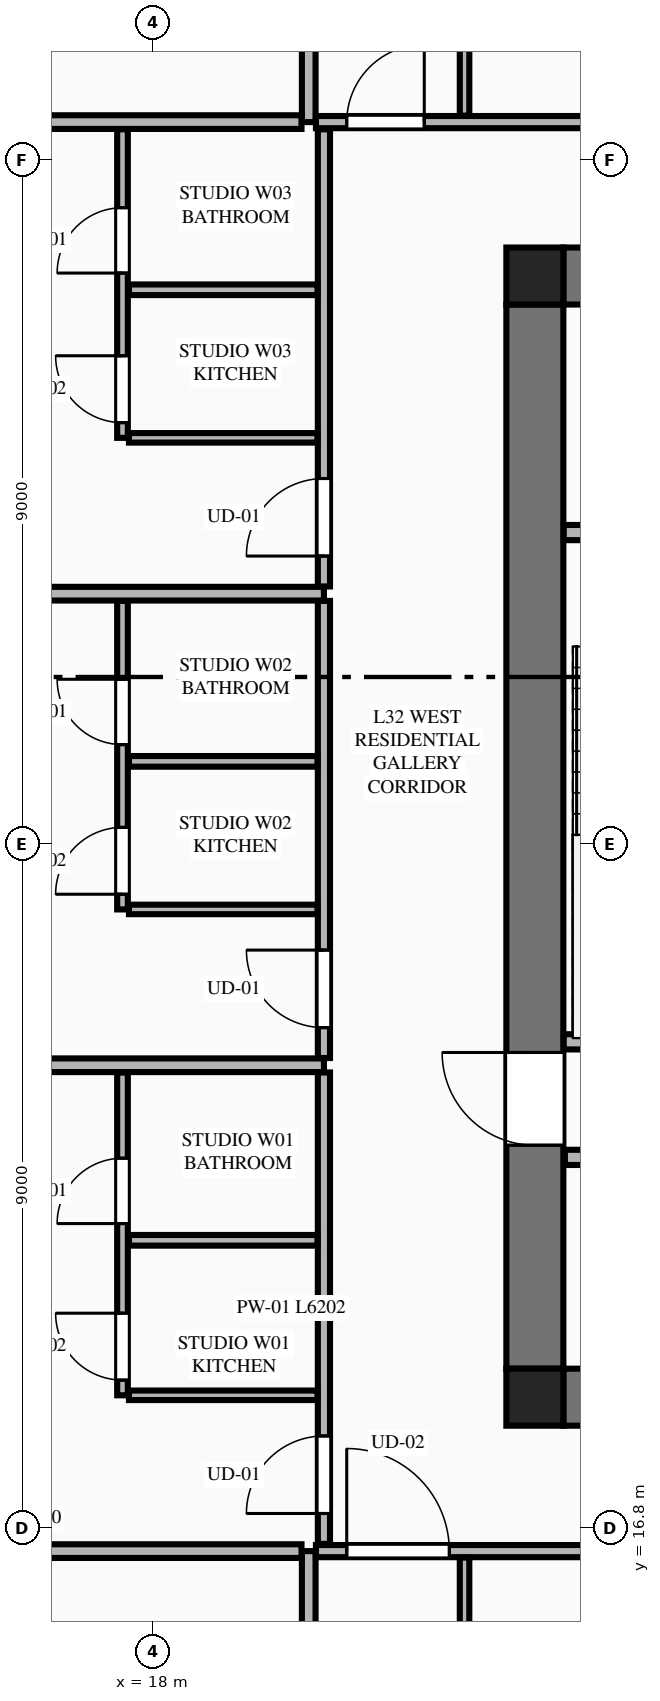
"""IFC4 building model, lengths in metres.
Left out: names, types, materials, properties, quantities, classifications, styles, units other than length and angle.
Written with IfcOpenShell. Run it as: python <this file> out.ifc"""

import sys

from ifc_helpers import new_model, si_unit, direction, frame, frame_2d, origin, origin_2d, place, context, subcontext, project, spatial, rectangle, extrude, element, fill, save


model = new_model("IFC4")
c1 = context("Model", 3, precision=1e-05, world=origin(), true_north=direction((0.0, 1.0)))
c2 = subcontext(c1, "Body", "Model", "MODEL_VIEW")
j1 = project(units=[si_unit("LENGTHUNIT", "METRE"), si_unit("PLANEANGLEUNIT", "RADIAN")], contexts=[c1])
p1 = place(None, origin())
s1 = spatial("IfcSite", under=j1, at=p1, CompositionType="ELEMENT")
p2 = place(p1, origin())
s2 = spatial("IfcBuilding", under=s1, at=p2, CompositionType="ELEMENT")
p3 = place(p2, frame((0.0, 0.0, 123.25)))
s3 = spatial("IfcBuildingStorey", under=s2, at=p3, CompositionType="ELEMENT", Elevation=123.25)
for number, where, z_axis, x_axis in (
    (1, (23.025, 18.525, 0.0), (0.0, 0.0, 1.0), (1.0, 0.0, 0.0)),
    (2, (23.025, 33.275, 0.0), (0.0, 0.0, 1.0), (1.0, 0.0, 0.0)),
):
    element("IfcColumn", number, at=place(p3, frame(where, z_axis=z_axis, x_axis=x_axis)), inside=s3, PredefinedType="COLUMN", context=c2, shape_type="SweptSolid", body=[
        extrude(rectangle(XDim=0.75, YDim=0.75, at=origin_2d()), origin(), (0.0, 0.0, 1.0), 3.55),
    ])
for number, where, z_axis, x_axis in (
    (3, (23.4, 18.525, 0.0), (0.0, 0.0, 1.0), (1.0, 0.0, 0.0)),
    (4, (23.4, 33.275, 0.0), (0.0, 0.0, 1.0), (1.0, 0.0, 0.0)),
):
    element("IfcWall", number, at=place(p3, frame(where, z_axis=z_axis, x_axis=x_axis)), inside=s3, PredefinedType="SHEAR", context=c2, shape_type="SweptSolid", body=[
        extrude(rectangle(XDim=18.0, YDim=0.75, at=frame_2d((9.0, 0.0))), origin(), (0.0, 0.0, 1.0), 3.34),
    ])
p4 = place(p3, frame((23.025, 18.9, 0.0), z_axis=(0.0, 0.0, 1.0), x_axis=(0.0, 1.0, 0.0)))
e5 = element("IfcWall", 5, at=p4, inside=s3, PredefinedType="SHEAR", context=c2, shape_type="SweptSolid", body=[
    extrude(rectangle(XDim=14.0, YDim=0.75, at=frame_2d((7.0, 0.0))), origin(), (0.0, 0.0, 1.0), 3.34),
])
p5 = place(p4, frame((2.94, 0.0, 0.0)))
e6 = element("IfcOpeningElement", 6, at=p5, cuts=e5, PredefinedType="OPENING", context=c2, shape_type="SweptSolid", body=[
    extrude(rectangle(XDim=1.22, YDim=2.25, at=frame_2d((0.61, 1.125))), frame((0.0, 0.385, 0.0), z_axis=(0.0, -1.0, 0.0), x_axis=(1.0, 0.0, 0.0)), (0.0, 0.0, 1.0), 0.77),
])
p6 = place(p3, frame((23.405, 23.2, 0.0), z_axis=(0.0, 0.0, 1.0), x_axis=(1.0, 0.0, 0.0)))
e7 = element("IfcWall", 7, at=p6, inside=s3, PredefinedType="PLUMBINGWALL", context=c2, shape_type="SweptSolid", body=[
    extrude(rectangle(XDim=3.27, YDim=0.2, at=frame_2d((1.635, 0.0))), origin(), (0.0, 0.0, 1.0), 3.34),
])
p7 = place(p3, frame((23.405, 29.9, 0.0), z_axis=(0.0, 0.0, 1.0), x_axis=(1.0, 0.0, 0.0)))
e8 = element("IfcWall", 8, at=p7, inside=s3, PredefinedType="PLUMBINGWALL", context=c2, shape_type="SweptSolid", body=[
    extrude(rectangle(XDim=3.27, YDim=0.2, at=frame_2d((1.635, 0.0))), origin(), (0.0, 0.0, 1.0), 3.34),
])
p8 = place(p7, frame((1.85, 0.0, 0.0)))
e9 = element("IfcOpeningElement", 9, at=p8, cuts=e8, PredefinedType="OPENING", context=c2, shape_type="SweptSolid", body=[
    extrude(rectangle(XDim=0.85, YDim=2.05, at=frame_2d((0.425, 1.025))), frame((0.0, 0.11, 0.0), z_axis=(0.0, -1.0, 0.0), x_axis=(1.0, 0.0, 0.0)), (0.0, 0.0, 1.0), 0.22),
])
p9 = place(p3, frame((23.42, 21.68, 0.0), z_axis=(0.0, 0.0, 1.0), x_axis=(1.0, 0.0, 0.0)))
e10 = element("IfcWall", 10, at=p9, inside=s3, PredefinedType="PLUMBINGWALL", context=c2, shape_type="SweptSolid", body=[
    extrude(rectangle(XDim=17.96, YDim=0.2, at=frame_2d((8.98, 0.0))), origin(), (0.0, 0.0, 1.0), 3.34),
])
p10 = place(p9, frame((11.6, 0.0, 0.0)))
e11 = element("IfcOpeningElement", 11, at=p10, cuts=e10, PredefinedType="OPENING", context=c2, shape_type="SweptSolid", body=[
    extrude(rectangle(XDim=1.1, YDim=2.2, at=frame_2d((0.55, 1.1))), frame((0.0, 0.11, 0.0), z_axis=(0.0, -1.0, 0.0), x_axis=(1.0, 0.0, 0.0)), (0.0, 0.0, 1.0), 0.22),
])
p11 = place(p9, frame((0.41, 0.0, 0.0)))
e12 = element("IfcOpeningElement", 12, at=p11, cuts=e10, PredefinedType="OPENING", context=c2, shape_type="SweptSolid", body=[
    extrude(rectangle(XDim=0.85, YDim=2.05, at=frame_2d((0.425, 1.025))), frame((0.0, 0.11, 0.0), z_axis=(0.0, -1.0, 0.0), x_axis=(1.0, 0.0, 0.0)), (0.0, 0.0, 1.0), 0.22),
])
p12 = place(p9, frame((13.78, 0.0, 0.0)))
e13 = element("IfcOpeningElement", 13, at=p12, cuts=e10, PredefinedType="OPENING", context=c2, shape_type="SweptSolid", body=[
    extrude(rectangle(XDim=0.85, YDim=2.05, at=frame_2d((0.425, 1.025))), frame((0.0, 0.11, 0.0), z_axis=(0.0, -1.0, 0.0), x_axis=(1.0, 0.0, 0.0)), (0.0, 0.0, 1.0), 0.22),
])
p13 = place(p9, frame((16.13, 0.0, 0.0)))
e14 = element("IfcOpeningElement", 14, at=p13, cuts=e10, PredefinedType="OPENING", context=c2, shape_type="SweptSolid", body=[
    extrude(rectangle(XDim=0.85, YDim=2.05, at=frame_2d((0.425, 1.025))), frame((0.0, 0.11, 0.0), z_axis=(0.0, -1.0, 0.0), x_axis=(1.0, 0.0, 0.0)), (0.0, 0.0, 1.0), 0.22),
])
p14 = place(p3, frame((20.05, 4.105, 0.0), z_axis=(0.0, 0.0, 1.0), x_axis=(0.0, 1.0, 0.0)))
e15 = element("IfcWall", 15, at=p14, inside=s3, PredefinedType="PARTITIONING", context=c2, shape_type="SweptSolid", body=[
    extrude(rectangle(XDim=12.395, YDim=0.18, at=frame_2d((6.198, 0.0))), origin(), (0.0, 0.0, 1.0), 3.34),
])
p15 = place(p3, frame((20.145, 16.5, 0.0), z_axis=(0.0, 0.0, 1.0), x_axis=(1.0, 0.0, 0.0)))
e16 = element("IfcWall", 16, at=p15, inside=s3, PredefinedType="PARTITIONING", context=c2, shape_type="SweptSolid", body=[
    extrude(rectangle(XDim=24.51, YDim=0.16, at=frame_2d((12.255, 0.0))), origin(), (0.0, 0.0, 1.0), 3.34),
])
p16 = place(p15, frame((0.405, 0.0, 0.0)))
e17 = element("IfcOpeningElement", 17, at=p16, cuts=e16, PredefinedType="OPENING", context=c2, shape_type="SweptSolid", body=[
    extrude(rectangle(XDim=1.35, YDim=2.35, at=frame_2d((0.675, 1.175))), frame((0.0, 0.09, 0.0), z_axis=(0.0, -1.0, 0.0), x_axis=(1.0, 0.0, 0.0)), (0.0, 0.0, 1.0), 0.18),
])
p17 = place(p3, frame((22.1, 10.284, 0.0), z_axis=(0.0, 0.0, 1.0), x_axis=(0.0, 1.0, 0.0)))
e18 = element("IfcWall", 18, at=p17, inside=s3, PredefinedType="PARTITIONING", context=c2, shape_type="SweptSolid", body=[
    extrude(rectangle(XDim=6.131, YDim=0.125, at=frame_2d((3.065, 0.0))), origin(), (0.0, 0.0, 1.0), 2.722),
])
p18 = place(p3, frame((20.05, 35.3, 0.0), z_axis=(0.0, 0.0, 1.0), x_axis=(0.0, 1.0, 0.0)))
e19 = element("IfcWall", 19, at=p18, inside=s3, PredefinedType="PARTITIONING", context=c2, shape_type="SweptSolid", body=[
    extrude(rectangle(XDim=12.195, YDim=0.18, at=frame_2d((6.098, 0.0))), origin(), (0.0, 0.0, 1.0), 3.34),
])
p19 = place(p3, frame((20.145, 35.3, 0.0), z_axis=(0.0, 0.0, 1.0), x_axis=(1.0, 0.0, 0.0)))
e20 = element("IfcWall", 20, at=p19, inside=s3, PredefinedType="PARTITIONING", context=c2, shape_type="SweptSolid", body=[
    extrude(rectangle(XDim=24.51, YDim=0.16, at=frame_2d((12.255, 0.0))), origin(), (0.0, 0.0, 1.0), 3.34),
])
p20 = place(p19, frame((0.405, 0.0, 0.0)))
e21 = element("IfcOpeningElement", 21, at=p20, cuts=e20, PredefinedType="OPENING", context=c2, shape_type="SweptSolid", body=[
    extrude(rectangle(XDim=1.02, YDim=2.25, at=frame_2d((0.51, 1.125))), frame((0.0, 0.09, 0.0), z_axis=(0.0, -1.0, 0.0), x_axis=(1.0, 0.0, 0.0)), (0.0, 0.0, 1.0), 0.18),
])
p21 = place(p3, frame((22.1, 35.385, 0.0), z_axis=(0.0, 0.0, 1.0), x_axis=(0.0, 1.0, 0.0)))
e22 = element("IfcWall", 22, at=p21, inside=s3, PredefinedType="PARTITIONING", context=c2, shape_type="SweptSolid", body=[
    extrude(rectangle(XDim=3.956, YDim=0.125, at=frame_2d((1.978, 0.0))), origin(), (0.0, 0.0, 1.0), 2.722),
])
p22 = place(p3, frame((12.185, 16.5, 0.0), z_axis=(0.0, 0.0, 1.0), x_axis=(1.0, 0.0, 0.0)))
e23 = element("IfcWall", 23, at=p22, inside=s3, PredefinedType="PARTITIONING", context=c2, shape_type="SweptSolid", body=[
    extrude(rectangle(XDim=7.77, YDim=0.18, at=frame_2d((3.885, 0.0))), origin(), (0.0, 0.0, 1.0), 3.34),
])
p23 = place(p3, frame((12.286, 35.3, 0.0), z_axis=(0.0, 0.0, 1.0), x_axis=(1.0, 0.0, 0.0)))
e24 = element("IfcWall", 24, at=p23, inside=s3, PredefinedType="PARTITIONING", context=c2, shape_type="SweptSolid", body=[
    extrude(rectangle(XDim=7.669, YDim=0.18, at=frame_2d((3.834, 0.0))), origin(), (0.0, 0.0, 1.0), 3.34),
])
p24 = place(p3, frame((20.25, 16.595, 0.0), z_axis=(0.0, 0.0, 1.0), x_axis=(0.0, 1.0, 0.0)))
e25 = element("IfcWall", 25, at=p24, inside=s3, PredefinedType="PARTITIONING", context=c2, shape_type="SweptSolid", body=[
    extrude(rectangle(XDim=6.202, YDim=0.16, at=frame_2d((3.101, 0.0))), origin(), (0.0, 0.0, 1.0), 3.34),
])
p25 = place(p24, frame((0.4, 0.0, 0.0)))
e26 = element("IfcOpeningElement", 26, at=p25, cuts=e25, PredefinedType="OPENING", context=c2, shape_type="SweptSolid", body=[
    extrude(rectangle(XDim=1.02, YDim=2.25, at=frame_2d((0.51, 1.125))), frame((0.0, 0.09, 0.0), z_axis=(0.0, -1.0, 0.0), x_axis=(1.0, 0.0, 0.0)), (0.0, 0.0, 1.0), 0.18),
])
p26 = place(p3, frame((17.685, 18.55, 0.0), z_axis=(0.0, 0.0, 1.0), x_axis=(1.0, 0.0, 0.0)))
e27 = element("IfcWall", 27, at=p26, inside=s3, PredefinedType="PARTITIONING", context=c2, shape_type="SweptSolid", body=[
    extrude(rectangle(XDim=2.48, YDim=0.125, at=frame_2d((1.24, 0.0))), origin(), (0.0, 0.0, 1.0), 2.722),
])
p27 = place(p3, frame((17.6, 18.55, 0.0), z_axis=(0.0, 0.0, 1.0), x_axis=(0.0, 1.0, 0.0)))
e28 = element("IfcWall", 28, at=p27, inside=s3, PredefinedType="PLUMBINGWALL", context=c2, shape_type="SweptSolid", body=[
    extrude(rectangle(XDim=4.247, YDim=0.14, at=frame_2d((2.124, 0.0))), origin(), (0.0, 0.0, 1.0), 3.34),
])
p28 = place(p27, frame((2.259, 0.0, 0.0)))
e29 = element("IfcOpeningElement", 29, at=p28, cuts=e28, PredefinedType="OPENING", context=c2, shape_type="SweptSolid", body=[
    extrude(rectangle(XDim=0.86, YDim=2.1, at=frame_2d((0.43, 1.05))), frame((0.0, 0.08, 0.0), z_axis=(0.0, -1.0, 0.0), x_axis=(1.0, 0.0, 0.0)), (0.0, 0.0, 1.0), 0.16),
])
p29 = place(p27, frame((0.2, 0.0, 0.0)))
e30 = element("IfcOpeningElement", 30, at=p29, cuts=e28, PredefinedType="OPENING", context=c2, shape_type="SweptSolid", body=[
    extrude(rectangle(XDim=0.88, YDim=2.15, at=frame_2d((0.44, 1.075))), frame((0.0, 0.08, 0.0), z_axis=(0.0, -1.0, 0.0), x_axis=(1.0, 0.0, 0.0)), (0.0, 0.0, 1.0), 0.16),
])
p30 = place(p3, frame((17.685, 20.589, 0.0), z_axis=(0.0, 0.0, 1.0), x_axis=(1.0, 0.0, 0.0)))
e31 = element("IfcWall", 31, at=p30, inside=s3, PredefinedType="PLUMBINGWALL", context=c2, shape_type="SweptSolid", body=[
    extrude(rectangle(XDim=2.48, YDim=0.14, at=frame_2d((1.24, 0.0))), origin(), (0.0, 0.0, 1.0), 3.34),
])
p31 = place(p3, frame((8.951, 22.892, 0.0), z_axis=(0.0, 0.0, 1.0), x_axis=(1.0, 0.0, 0.0)))
e32 = element("IfcWall", 32, at=p31, inside=s3, PredefinedType="PARTITIONING", context=c2, shape_type="SweptSolid", body=[
    extrude(rectangle(XDim=11.299, YDim=0.18, at=frame_2d((5.649, 0.0))), origin(), (0.0, 0.0, 1.0), 3.34),
])
p32 = place(p3, frame((20.25, 22.987, 0.0), z_axis=(0.0, 0.0, 1.0), x_axis=(0.0, 1.0, 0.0)))
e33 = element("IfcWall", 33, at=p32, inside=s3, PredefinedType="PARTITIONING", context=c2, shape_type="SweptSolid", body=[
    extrude(rectangle(XDim=6.014, YDim=0.16, at=frame_2d((3.007, 0.0))), origin(), (0.0, 0.0, 1.0), 3.34),
])
p33 = place(p32, frame((0.4, 0.0, 0.0)))
e34 = element("IfcOpeningElement", 34, at=p33, cuts=e33, PredefinedType="OPENING", context=c2, shape_type="SweptSolid", body=[
    extrude(rectangle(XDim=1.02, YDim=2.25, at=frame_2d((0.51, 1.125))), frame((0.0, 0.09, 0.0), z_axis=(0.0, -1.0, 0.0), x_axis=(1.0, 0.0, 0.0)), (0.0, 0.0, 1.0), 0.18),
])
p34 = place(p3, frame((17.685, 24.942, 0.0), z_axis=(0.0, 0.0, 1.0), x_axis=(1.0, 0.0, 0.0)))
e35 = element("IfcWall", 35, at=p34, inside=s3, PredefinedType="PARTITIONING", context=c2, shape_type="SweptSolid", body=[
    extrude(rectangle(XDim=2.48, YDim=0.125, at=frame_2d((1.24, 0.0))), origin(), (0.0, 0.0, 1.0), 3.34),
])
p35 = place(p3, frame((17.6, 24.942, 0.0), z_axis=(0.0, 0.0, 1.0), x_axis=(0.0, 1.0, 0.0)))
e36 = element("IfcWall", 36, at=p35, inside=s3, PredefinedType="PLUMBINGWALL", context=c2, shape_type="SweptSolid", body=[
    extrude(rectangle(XDim=4.059, YDim=0.14, at=frame_2d((2.03, 0.0))), origin(), (0.0, 0.0, 1.0), 3.34),
])
p36 = place(p35, frame((2.168, 0.0, 0.0)))
e37 = element("IfcOpeningElement", 37, at=p36, cuts=e36, PredefinedType="OPENING", context=c2, shape_type="SweptSolid", body=[
    extrude(rectangle(XDim=0.86, YDim=2.1, at=frame_2d((0.43, 1.05))), frame((0.0, 0.08, 0.0), z_axis=(0.0, -1.0, 0.0), x_axis=(1.0, 0.0, 0.0)), (0.0, 0.0, 1.0), 0.16),
])
p37 = place(p35, frame((0.2, 0.0, 0.0)))
e38 = element("IfcOpeningElement", 38, at=p37, cuts=e36, PredefinedType="OPENING", context=c2, shape_type="SweptSolid", body=[
    extrude(rectangle(XDim=0.88, YDim=2.15, at=frame_2d((0.44, 1.075))), frame((0.0, 0.08, 0.0), z_axis=(0.0, -1.0, 0.0), x_axis=(1.0, 0.0, 0.0)), (0.0, 0.0, 1.0), 0.16),
])
p38 = place(p3, frame((17.685, 26.89, 0.0), z_axis=(0.0, 0.0, 1.0), x_axis=(1.0, 0.0, 0.0)))
e39 = element("IfcWall", 39, at=p38, inside=s3, PredefinedType="PLUMBINGWALL", context=c2, shape_type="SweptSolid", body=[
    extrude(rectangle(XDim=2.48, YDim=0.14, at=frame_2d((1.24, 0.0))), origin(), (0.0, 0.0, 1.0), 3.34),
])
p39 = place(p3, frame((9.147, 29.096, 0.0), z_axis=(0.0, 0.0, 1.0), x_axis=(1.0, 0.0, 0.0)))
e40 = element("IfcWall", 40, at=p39, inside=s3, PredefinedType="PARTITIONING", context=c2, shape_type="SweptSolid", body=[
    extrude(rectangle(XDim=11.103, YDim=0.18, at=frame_2d((5.552, 0.0))), origin(), (0.0, 0.0, 1.0), 3.34),
])
p40 = place(p3, frame((20.25, 29.191, 0.0), z_axis=(0.0, 0.0, 1.0), x_axis=(0.0, 1.0, 0.0)))
e41 = element("IfcWall", 41, at=p40, inside=s3, PredefinedType="PARTITIONING", context=c2, shape_type="SweptSolid", body=[
    extrude(rectangle(XDim=6.014, YDim=0.16, at=frame_2d((3.007, 0.0))), origin(), (0.0, 0.0, 1.0), 3.34),
])
p41 = place(p40, frame((0.4, 0.0, 0.0)))
e42 = element("IfcOpeningElement", 42, at=p41, cuts=e41, PredefinedType="OPENING", context=c2, shape_type="SweptSolid", body=[
    extrude(rectangle(XDim=1.02, YDim=2.25, at=frame_2d((0.51, 1.125))), frame((0.0, 0.09, 0.0), z_axis=(0.0, -1.0, 0.0), x_axis=(1.0, 0.0, 0.0)), (0.0, 0.0, 1.0), 0.18),
])
p42 = place(p3, frame((17.685, 31.146, 0.0), z_axis=(0.0, 0.0, 1.0), x_axis=(1.0, 0.0, 0.0)))
e43 = element("IfcWall", 43, at=p42, inside=s3, PredefinedType="PARTITIONING", context=c2, shape_type="SweptSolid", body=[
    extrude(rectangle(XDim=2.48, YDim=0.125, at=frame_2d((1.24, 0.0))), origin(), (0.0, 0.0, 1.0), 3.34),
])
p43 = place(p3, frame((17.6, 31.146, 0.0), z_axis=(0.0, 0.0, 1.0), x_axis=(0.0, 1.0, 0.0)))
e44 = element("IfcWall", 44, at=p43, inside=s3, PredefinedType="PLUMBINGWALL", context=c2, shape_type="SweptSolid", body=[
    extrude(rectangle(XDim=4.059, YDim=0.14, at=frame_2d((2.03, 0.0))), origin(), (0.0, 0.0, 1.0), 3.34),
])
p44 = place(p43, frame((2.168, 0.0, 0.0)))
e45 = element("IfcOpeningElement", 45, at=p44, cuts=e44, PredefinedType="OPENING", context=c2, shape_type="SweptSolid", body=[
    extrude(rectangle(XDim=0.86, YDim=2.1, at=frame_2d((0.43, 1.05))), frame((0.0, 0.08, 0.0), z_axis=(0.0, -1.0, 0.0), x_axis=(1.0, 0.0, 0.0)), (0.0, 0.0, 1.0), 0.16),
])
p45 = place(p43, frame((0.2, 0.0, 0.0)))
e46 = element("IfcOpeningElement", 46, at=p45, cuts=e44, PredefinedType="OPENING", context=c2, shape_type="SweptSolid", body=[
    extrude(rectangle(XDim=0.88, YDim=2.15, at=frame_2d((0.44, 1.075))), frame((0.0, 0.08, 0.0), z_axis=(0.0, -1.0, 0.0), x_axis=(1.0, 0.0, 0.0)), (0.0, 0.0, 1.0), 0.16),
])
p46 = place(p3, frame((17.685, 33.094, 0.0), z_axis=(0.0, 0.0, 1.0), x_axis=(1.0, 0.0, 0.0)))
e47 = element("IfcWall", 47, at=p46, inside=s3, PredefinedType="PLUMBINGWALL", context=c2, shape_type="SweptSolid", body=[
    extrude(rectangle(XDim=2.48, YDim=0.14, at=frame_2d((1.24, 0.0))), origin(), (0.0, 0.0, 1.0), 3.34),
])
p47 = place(p5, origin())
e48 = element("IfcDoor", 48, at=p47, inside=s3, OperationType="SINGLE_SWING_RIGHT", PredefinedType="DOOR", context=c2, shape_type="SweptSolid", body=[
    extrude(rectangle(XDim=1.22, YDim=2.25, at=frame_2d((0.61, 1.125))), frame((0.0, 0.025, 0.0), z_axis=(0.0, -1.0, 0.0), x_axis=(1.0, 0.0, 0.0)), (0.0, 0.0, 1.0), 0.05),
])
fill(e6, e48)
p48 = place(p16, origin())
e49 = element("IfcDoor", 49, at=p48, inside=s3, OperationType="SINGLE_SWING_LEFT", PredefinedType="DOOR", context=c2, shape_type="SweptSolid", body=[
    extrude(rectangle(XDim=1.35, YDim=2.35, at=frame_2d((0.675, 1.175))), frame((0.0, 0.025, 0.0), z_axis=(0.0, -1.0, 0.0), x_axis=(1.0, 0.0, 0.0)), (0.0, 0.0, 1.0), 0.05),
])
fill(e17, e49)
p49 = place(p20, origin())
e50 = element("IfcDoor", 50, at=p49, inside=s3, OperationType="SINGLE_SWING_RIGHT", PredefinedType="DOOR", context=c2, shape_type="SweptSolid", body=[
    extrude(rectangle(XDim=1.02, YDim=2.25, at=frame_2d((0.51, 1.125))), frame((0.0, 0.025, 0.0), z_axis=(0.0, -1.0, 0.0), x_axis=(1.0, 0.0, 0.0)), (0.0, 0.0, 1.0), 0.05),
])
fill(e21, e50)
p50 = place(p28, origin())
e51 = element("IfcDoor", 51, at=p50, inside=s3, OperationType="SINGLE_SWING_LEFT", PredefinedType="DOOR", context=c2, shape_type="SweptSolid", body=[
    extrude(rectangle(XDim=0.86, YDim=2.1, at=frame_2d((0.43, 1.05))), frame((0.0, 0.025, 0.0), z_axis=(0.0, -1.0, 0.0), x_axis=(1.0, 0.0, 0.0)), (0.0, 0.0, 1.0), 0.05),
])
fill(e29, e51)
p51 = place(p25, origin())
e52 = element("IfcDoor", 52, at=p51, inside=s3, OperationType="SINGLE_SWING_LEFT", PredefinedType="DOOR", context=c2, shape_type="SweptSolid", body=[
    extrude(rectangle(XDim=1.02, YDim=2.25, at=frame_2d((0.51, 1.125))), frame((0.0, 0.025, 0.0), z_axis=(0.0, -1.0, 0.0), x_axis=(1.0, 0.0, 0.0)), (0.0, 0.0, 1.0), 0.05),
])
fill(e26, e52)
p52 = place(p29, origin())
e53 = element("IfcDoor", 53, at=p52, inside=s3, OperationType="SINGLE_SWING_RIGHT", PredefinedType="DOOR", context=c2, shape_type="SweptSolid", body=[
    extrude(rectangle(XDim=0.88, YDim=2.15, at=frame_2d((0.44, 1.075))), frame((0.0, 0.025, 0.0), z_axis=(0.0, -1.0, 0.0), x_axis=(1.0, 0.0, 0.0)), (0.0, 0.0, 1.0), 0.05),
])
fill(e30, e53)
p53 = place(p36, origin())
e54 = element("IfcDoor", 54, at=p53, inside=s3, OperationType="SINGLE_SWING_RIGHT", PredefinedType="DOOR", context=c2, shape_type="SweptSolid", body=[
    extrude(rectangle(XDim=0.86, YDim=2.1, at=frame_2d((0.43, 1.05))), frame((0.0, 0.025, 0.0), z_axis=(0.0, -1.0, 0.0), x_axis=(1.0, 0.0, 0.0)), (0.0, 0.0, 1.0), 0.05),
])
fill(e37, e54)
p54 = place(p33, origin())
e55 = element("IfcDoor", 55, at=p54, inside=s3, OperationType="SINGLE_SWING_RIGHT", PredefinedType="DOOR", context=c2, shape_type="SweptSolid", body=[
    extrude(rectangle(XDim=1.02, YDim=2.25, at=frame_2d((0.51, 1.125))), frame((0.0, 0.025, 0.0), z_axis=(0.0, -1.0, 0.0), x_axis=(1.0, 0.0, 0.0)), (0.0, 0.0, 1.0), 0.05),
])
fill(e34, e55)
p55 = place(p37, origin())
e56 = element("IfcDoor", 56, at=p55, inside=s3, OperationType="SINGLE_SWING_LEFT", PredefinedType="DOOR", context=c2, shape_type="SweptSolid", body=[
    extrude(rectangle(XDim=0.88, YDim=2.15, at=frame_2d((0.44, 1.075))), frame((0.0, 0.025, 0.0), z_axis=(0.0, -1.0, 0.0), x_axis=(1.0, 0.0, 0.0)), (0.0, 0.0, 1.0), 0.05),
])
fill(e38, e56)
p56 = place(p44, origin())
e57 = element("IfcDoor", 57, at=p56, inside=s3, OperationType="SINGLE_SWING_LEFT", PredefinedType="DOOR", context=c2, shape_type="SweptSolid", body=[
    extrude(rectangle(XDim=0.86, YDim=2.1, at=frame_2d((0.43, 1.05))), frame((0.0, 0.025, 0.0), z_axis=(0.0, -1.0, 0.0), x_axis=(1.0, 0.0, 0.0)), (0.0, 0.0, 1.0), 0.05),
])
fill(e45, e57)
p57 = place(p41, origin())
e58 = element("IfcDoor", 58, at=p57, inside=s3, OperationType="SINGLE_SWING_LEFT", PredefinedType="DOOR", context=c2, shape_type="SweptSolid", body=[
    extrude(rectangle(XDim=1.02, YDim=2.25, at=frame_2d((0.51, 1.125))), frame((0.0, 0.025, 0.0), z_axis=(0.0, -1.0, 0.0), x_axis=(1.0, 0.0, 0.0)), (0.0, 0.0, 1.0), 0.05),
])
fill(e42, e58)
p58 = place(p45, origin())
e59 = element("IfcDoor", 59, at=p58, inside=s3, OperationType="SINGLE_SWING_RIGHT", PredefinedType="DOOR", context=c2, shape_type="SweptSolid", body=[
    extrude(rectangle(XDim=0.88, YDim=2.15, at=frame_2d((0.44, 1.075))), frame((0.0, 0.025, 0.0), z_axis=(0.0, -1.0, 0.0), x_axis=(1.0, 0.0, 0.0)), (0.0, 0.0, 1.0), 0.05),
])
fill(e46, e59)
save(model, sys.argv[1])
